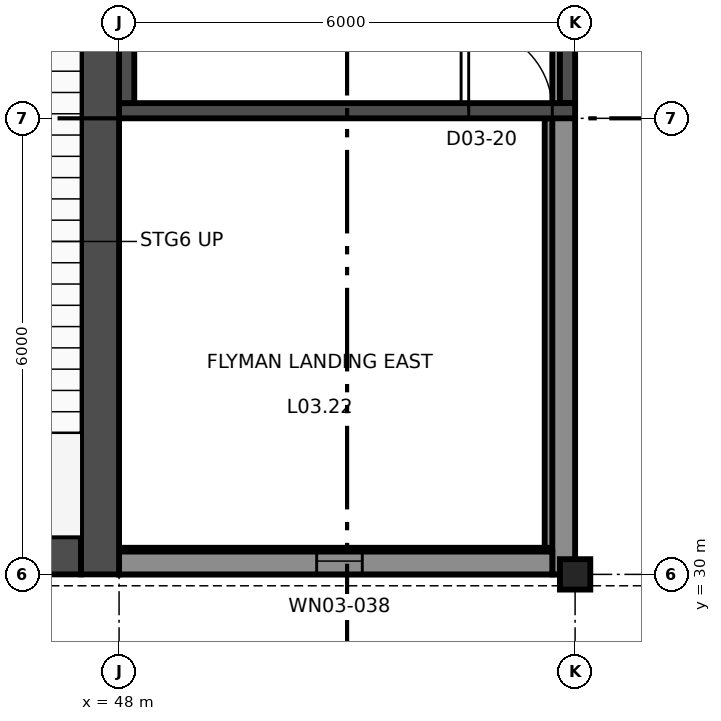
"""IFC4 building model, lengths in metres.
Left out: names, types, materials, properties, quantities, classifications, styles, units other than length and angle.
Written with IfcOpenShell. Run it as: python <this file> out.ifc"""

import sys

from ifc_helpers import new_model, si_unit, direction, frame, frame_2d, origin, origin_2d, place, context, subcontext, project, spatial, rectangle, extrude, element, fill, save


model = new_model("IFC4")
c1 = context("Model", 3, precision=1e-05, world=origin(), true_north=direction((0.0, 1.0)))
c2 = subcontext(c1, "Body", "Model", "MODEL_VIEW")
j1 = project(units=[si_unit("LENGTHUNIT", "METRE"), si_unit("PLANEANGLEUNIT", "RADIAN")], contexts=[c1])
p1 = place(None, origin())
s1 = spatial("IfcSite", under=j1, at=p1, CompositionType="ELEMENT")
p2 = place(p1, origin())
s2 = spatial("IfcBuilding", under=s1, at=p2, CompositionType="ELEMENT")
p3 = place(p2, frame((0.0, 0.0, 16.5)))
s3 = spatial("IfcBuildingStorey", under=s2, at=p3, CompositionType="ELEMENT", Elevation=16.5)
p4 = place(p3, frame((54.0, 30.0, 0.0), z_axis=(0.0, 0.0, 1.0), x_axis=(1.0, 0.0, 0.0)))
e1 = element("IfcColumn", 1, at=p4, inside=s3, PredefinedType="COLUMN", context=c2, shape_type="SweptSolid", body=[
    extrude(rectangle(XDim=0.4, YDim=0.4, at=origin_2d()), origin(), (0.0, 0.0, 1.0), 4.5),
])
p5 = place(p3, frame((48.0, 36.1, 0.0), z_axis=(0.0, 0.0, 1.0), x_axis=(1.0, 0.0, 0.0)))
e2 = element("IfcWall", 2, at=p5, inside=s3, PredefinedType="SHEAR", context=c2, shape_type="SweptSolid", body=[
    extrude(rectangle(XDim=6.0, YDim=0.2, at=frame_2d((3.0, 0.0))), origin(), (0.0, 0.0, 1.0), 4.5),
])
p6 = place(p5, frame((4.6, 0.0, 0.0)))
e3 = element("IfcOpeningElement", 3, at=p6, cuts=e2, PredefinedType="OPENING", context=c2, shape_type="SweptSolid", body=[
    extrude(rectangle(XDim=1.1, YDim=2.2, at=frame_2d((0.55, 1.1))), frame((0.0, 0.11, 0.0), z_axis=(0.0, -1.0, 0.0), x_axis=(1.0, 0.0, 0.0)), (0.0, 0.0, 1.0), 0.22),
])
for number, where, z_axis, x_axis in (
    (4, (48.1, 36.2, 0.0), (0.0, 0.0, 1.0), (0.0, 1.0, 0.0)),
    (5, (53.9, 36.2, 0.0), (0.0, 0.0, 1.0), (0.0, 1.0, 0.0)),
):
    element("IfcWall", number, at=place(p3, frame(where, z_axis=z_axis, x_axis=x_axis)), inside=s3, PredefinedType="SHEAR", context=c2, shape_type="SweptSolid", body=[
        extrude(rectangle(XDim=5.6, YDim=0.2, at=frame_2d((2.8, 0.0))), origin(), (0.0, 0.0, 1.0), 4.5),
    ])
p7 = place(p3, frame((47.75, 30.0, 0.0), z_axis=(0.0, 0.0, 1.0), x_axis=(0.0, 1.0, 0.0)))
e6 = element("IfcWall", 6, at=p7, inside=s3, PredefinedType="SHEAR", context=c2, shape_type="SweptSolid", body=[
    extrude(rectangle(XDim=24.0, YDim=0.5, at=frame_2d((12.0, 0.0))), origin(), (0.0, 0.0, 1.0), 6.5),
])
p8 = place(p3, frame((18.5, 30.25, 0.0), z_axis=(0.0, 0.0, 1.0), x_axis=(1.0, 0.0, 0.0)))
e7 = element("IfcWall", 7, at=p8, inside=s3, PredefinedType="SHEAR", context=c2, shape_type="SweptSolid", body=[
    extrude(rectangle(XDim=29.0, YDim=0.5, at=frame_2d((14.5, 0.0))), origin(), (0.0, 0.0, 1.0), 6.5),
])
p9 = place(p3, frame((53.775, 36.0, 0.0), z_axis=(0.0, 0.0, 1.0), x_axis=(0.0, -1.0, 0.0)))
e8 = element("IfcWall", 8, at=p9, inside=s3, PredefinedType="SOLIDWALL", context=c2, shape_type="SweptSolid", body=[
    extrude(rectangle(XDim=5.8, YDim=0.35, at=frame_2d((2.9, 0.0))), origin(), (0.0, 0.0, 1.0), 3.9),
])
p10 = place(p3, frame((53.8, 30.175, 0.0), z_axis=(0.0, 0.0, 1.0), x_axis=(-1.0, 0.0, 0.0)))
e9 = element("IfcWall", 9, at=p10, inside=s3, PredefinedType="SOLIDWALL", context=c2, shape_type="SweptSolid", body=[
    extrude(rectangle(XDim=5.8, YDim=0.35, at=frame_2d((2.9, 0.0))), origin(), (0.0, 0.0, 1.0), 3.9),
])
p11 = place(p10, frame((2.6, 0.0, 1.5)))
e10 = element("IfcOpeningElement", 10, at=p11, cuts=e9, PredefinedType="OPENING", context=c2, shape_type="SweptSolid", body=[
    extrude(rectangle(XDim=0.6, YDim=2.2, at=frame_2d((0.3, 1.1))), frame((0.0, 0.185, 0.0), z_axis=(0.0, -1.0, 0.0), x_axis=(1.0, 0.0, 0.0)), (0.0, 0.0, 1.0), 0.37),
])
p12 = place(p3, frame((53.85, 30.0, 4.5), z_axis=(0.0, 0.0, 1.0), x_axis=(0.0, 1.0, 0.0)))
e11 = element("IfcWall", 11, at=p12, inside=s3, PredefinedType="PARAPET", context=c2, shape_type="SweptSolid", body=[
    extrude(rectangle(XDim=60.0, YDim=0.3, at=frame_2d((30.0, 0.0))), origin(), (0.0, 0.0, 1.0), 1.2),
])
p13 = place(p3, frame((53.7, 30.15, 4.5), z_axis=(0.0, 0.0, 1.0), x_axis=(-1.0, 0.0, 0.0)))
e12 = element("IfcWall", 12, at=p13, inside=s3, PredefinedType="PARAPET", context=c2, shape_type="SweptSolid", body=[
    extrude(rectangle(XDim=5.7, YDim=0.3, at=frame_2d((2.85, 0.0))), origin(), (0.0, 0.0, 1.0), 1.2),
])
p14 = place(p11, origin())
e13 = element("IfcWindow", 13, at=p14, inside=s3, PartitioningType="SINGLE_PANEL", PredefinedType="WINDOW", context=c2, shape_type="SweptSolid", body=[
    extrude(rectangle(XDim=0.6, YDim=2.2, at=frame_2d((0.3, 1.1))), frame((0.0, 0.03, 0.0), z_axis=(0.0, -1.0, 0.0), x_axis=(1.0, 0.0, 0.0)), (0.0, 0.0, 1.0), 0.06),
])
fill(e10, e13)
p15 = place(p6, origin())
e14 = element("IfcDoor", 14, at=p15, inside=s3, OperationType="SINGLE_SWING_LEFT", PredefinedType="DOOR", context=c2, shape_type="SweptSolid", body=[
    extrude(rectangle(XDim=1.1, YDim=2.2, at=frame_2d((0.55, 1.1))), frame((0.0, 0.025, 0.0), z_axis=(0.0, -1.0, 0.0), x_axis=(1.0, 0.0, 0.0)), (0.0, 0.0, 1.0), 0.05),
])
fill(e3, e14)
save(model, sys.argv[1])
